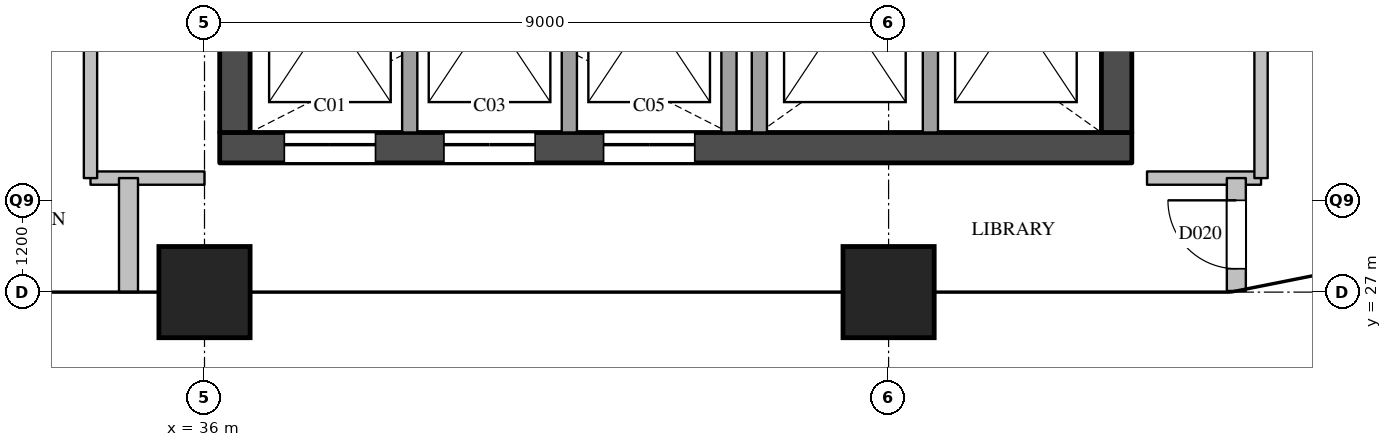
"""IFC4 building model, lengths in metres.
Left out: names, types, materials, properties, quantities, classifications, styles, units other than length and angle.
Written with IfcOpenShell. Run it as: python <this file> out.ifc"""

import sys

from ifc_helpers import new_model, si_unit, direction, frame, frame_2d, origin, origin_2d, place, context, subcontext, project, spatial, rectangle, extrude, element, fill, save


model = new_model("IFC4")
c1 = context("Model", 3, precision=1e-05, world=origin(), true_north=direction((0.0, 1.0)))
c2 = subcontext(c1, "Body", "Model", "MODEL_VIEW")
j1 = project(units=[si_unit("LENGTHUNIT", "METRE"), si_unit("PLANEANGLEUNIT", "RADIAN")], contexts=[c1])
p1 = place(None, origin())
s1 = spatial("IfcSite", under=j1, at=p1, CompositionType="ELEMENT")
p2 = place(p1, origin())
s2 = spatial("IfcBuilding", under=s1, at=p2, CompositionType="ELEMENT")
p3 = place(p2, frame((0.0, 0.0, 246.2)))
s3 = spatial("IfcBuildingStorey", under=s2, at=p3, CompositionType="ELEMENT", Elevation=246.2)
for number, where, z_axis, x_axis in (
    (1, (36.0, 27.0, 0.0), (0.0, 0.0, 1.0), (1.0, 0.0, 0.0)),
    (2, (45.0, 27.0, 0.0), (0.0, 0.0, 1.0), (1.0, 0.0, 0.0)),
):
    element("IfcColumn", number, at=place(p3, frame(where, z_axis=z_axis, x_axis=x_axis)), inside=s3, PredefinedType="COLUMN", context=c2, shape_type="SweptSolid", body=[
        extrude(rectangle(XDim=1.2, YDim=1.2, at=origin_2d()), origin(), (0.0, 0.0, 1.0), 3.9),
    ])
p4 = place(p3, frame((36.2, 28.9, 0.0), z_axis=(0.0, 0.0, 1.0), x_axis=(1.0, 0.0, 0.0)))
e3 = element("IfcWall", 3, at=p4, inside=s3, PredefinedType="SHEAR", context=c2, shape_type="SweptSolid", body=[
    extrude(rectangle(XDim=12.0, YDim=0.4, at=frame_2d((6.0, 0.0))), origin(), (0.0, 0.0, 1.0), 3.6),
])
p5 = place(p4, frame((0.85, 0.0, 0.0)))
e4 = element("IfcOpeningElement", 4, at=p5, cuts=e3, PredefinedType="OPENING", context=c2, shape_type="SweptSolid", body=[
    extrude(rectangle(XDim=1.2, YDim=2.1, at=frame_2d((0.6, 1.05))), frame((0.0, 0.21, 0.0), z_axis=(0.0, -1.0, 0.0), x_axis=(1.0, 0.0, 0.0)), (0.0, 0.0, 1.0), 0.42),
])
p6 = place(p4, frame((2.95, 0.0, 0.0)))
e5 = element("IfcOpeningElement", 5, at=p6, cuts=e3, PredefinedType="OPENING", context=c2, shape_type="SweptSolid", body=[
    extrude(rectangle(XDim=1.2, YDim=2.1, at=frame_2d((0.6, 1.05))), frame((0.0, 0.21, 0.0), z_axis=(0.0, -1.0, 0.0), x_axis=(1.0, 0.0, 0.0)), (0.0, 0.0, 1.0), 0.42),
])
p7 = place(p4, frame((5.05, 0.0, 0.0)))
e6 = element("IfcOpeningElement", 6, at=p7, cuts=e3, PredefinedType="OPENING", context=c2, shape_type="SweptSolid", body=[
    extrude(rectangle(XDim=1.2, YDim=2.1, at=frame_2d((0.6, 1.05))), frame((0.0, 0.21, 0.0), z_axis=(0.0, -1.0, 0.0), x_axis=(1.0, 0.0, 0.0)), (0.0, 0.0, 1.0), 0.42),
])
p8 = place(p3, frame((36.4, 29.1, 0.0), z_axis=(0.0, 0.0, 1.0), x_axis=(0.0, 1.0, 0.0)))
e7 = element("IfcWall", 7, at=p8, inside=s3, PredefinedType="SHEAR", context=c2, shape_type="SweptSolid", body=[
    extrude(rectangle(XDim=20.3, YDim=0.4, at=frame_2d((10.15, 0.0))), origin(), (0.0, 0.0, 1.0), 3.6),
])
p9 = place(p8, frame((3.6, 0.0, 0.0)))
e8 = element("IfcOpeningElement", 8, at=p9, cuts=e7, PredefinedType="OPENING", context=c2, shape_type="SweptSolid", body=[
    extrude(rectangle(XDim=1.8, YDim=2.1, at=frame_2d((0.9, 1.05))), frame((0.0, 0.21, 0.0), z_axis=(0.0, -1.0, 0.0), x_axis=(1.0, 0.0, 0.0)), (0.0, 0.0, 1.0), 0.42),
])
p10 = place(p8, frame((16.4, 0.0, 0.0)))
e9 = element("IfcOpeningElement", 9, at=p10, cuts=e7, PredefinedType="OPENING", context=c2, shape_type="SweptSolid", body=[
    extrude(rectangle(XDim=1.0, YDim=2.1, at=frame_2d((0.5, 1.05))), frame((0.0, 0.21, 0.0), z_axis=(0.0, -1.0, 0.0), x_axis=(1.0, 0.0, 0.0)), (0.0, 0.0, 1.0), 0.42),
])
p11 = place(p3, frame((48.0, 29.1, 0.0), z_axis=(0.0, 0.0, 1.0), x_axis=(0.0, 1.0, 0.0)))
e10 = element("IfcWall", 10, at=p11, inside=s3, PredefinedType="SHEAR", context=c2, shape_type="SweptSolid", body=[
    extrude(rectangle(XDim=20.3, YDim=0.4, at=frame_2d((10.15, 0.0))), origin(), (0.0, 0.0, 1.0), 3.6),
])
p12 = place(p11, frame((12.5, 0.0, 0.0)))
e11 = element("IfcOpeningElement", 11, at=p12, cuts=e10, PredefinedType="OPENING", context=c2, shape_type="SweptSolid", body=[
    extrude(rectangle(XDim=0.7, YDim=2.1, at=frame_2d((0.35, 1.05))), frame((0.0, 0.21, 0.0), z_axis=(0.0, -1.0, 0.0), x_axis=(1.0, 0.0, 0.0)), (0.0, 0.0, 1.0), 0.42),
])
p13 = place(p11, frame((3.9, 0.0, 0.0)))
e12 = element("IfcOpeningElement", 12, at=p13, cuts=e10, PredefinedType="OPENING", context=c2, shape_type="SweptSolid", body=[
    extrude(rectangle(XDim=1.8, YDim=2.1, at=frame_2d((0.9, 1.05))), frame((0.0, 0.21, 0.0), z_axis=(0.0, -1.0, 0.0), x_axis=(1.0, 0.0, 0.0)), (0.0, 0.0, 1.0), 0.42),
])
for number, where, z_axis, x_axis in (
    (13, (38.7, 29.1, 0.0), (0.0, 0.0, 1.0), (0.0, 1.0, 0.0)),
    (14, (40.8, 29.1, 0.0), (0.0, 0.0, 1.0), (0.0, 1.0, 0.0)),
    (15, (42.9, 29.1, 0.0), (0.0, 0.0, 1.0), (0.0, 1.0, 0.0)),
):
    element("IfcWall", number, at=place(p3, frame(where, z_axis=z_axis, x_axis=x_axis)), inside=s3, PredefinedType="SOLIDWALL", context=c2, shape_type="SweptSolid", body=[
        extrude(rectangle(XDim=3.2, YDim=0.2, at=frame_2d((1.6, 0.0))), origin(), (0.0, 0.0, 1.0), 3.6),
    ])
p14 = place(p3, frame((43.3, 29.1, 0.0), z_axis=(0.0, 0.0, 1.0), x_axis=(0.0, 1.0, 0.0)))
e16 = element("IfcWall", 16, at=p14, inside=s3, PredefinedType="SOLIDWALL", context=c2, shape_type="SweptSolid", body=[
    extrude(rectangle(XDim=9.9, YDim=0.2, at=frame_2d((4.95, 0.0))), origin(), (0.0, 0.0, 1.0), 3.6),
])
p15 = place(p3, frame((45.55, 29.1, 0.0), z_axis=(0.0, 0.0, 1.0), x_axis=(0.0, 1.0, 0.0)))
e17 = element("IfcWall", 17, at=p15, inside=s3, PredefinedType="SOLIDWALL", context=c2, shape_type="SweptSolid", body=[
    extrude(rectangle(XDim=3.2, YDim=0.2, at=frame_2d((1.6, 0.0))), origin(), (0.0, 0.0, 1.0), 3.6),
])
for number, where, z_axis, x_axis in (
    (18, (34.5, 28.5, 0.0), (0.0, 0.0, 1.0), (1.0, 0.0, 0.0)),
    (19, (48.4, 28.5, 0.0), (0.0, 0.0, 1.0), (1.0, 0.0, 0.0)),
):
    element("IfcWall", number, at=place(p3, frame(where, z_axis=z_axis, x_axis=x_axis)), inside=s3, PredefinedType="PARTITIONING", context=c2, shape_type="SweptSolid", body=[
        extrude(rectangle(XDim=1.5, YDim=0.175, at=frame_2d((0.75, 0.0))), origin(), (0.0, 0.0, 1.0), 3.6),
    ])
p16 = place(p3, frame((34.5, 28.5, 0.0), z_axis=(0.0, 0.0, 1.0), x_axis=(0.0, 1.0, 0.0)))
e20 = element("IfcWall", 20, at=p16, inside=s3, PredefinedType="PARTITIONING", context=c2, shape_type="SweptSolid", body=[
    extrude(rectangle(XDim=15.7, YDim=0.175, at=frame_2d((7.85, 0.0))), origin(), (0.0, 0.0, 1.0), 3.6),
])
p17 = place(p16, frame((10.1, 0.0, 0.0)))
e21 = element("IfcOpeningElement", 21, at=p17, cuts=e20, PredefinedType="OPENING", context=c2, shape_type="SweptSolid", body=[
    extrude(rectangle(XDim=1.0, YDim=2.1, at=frame_2d((0.5, 1.05))), frame((0.0, 0.097, 0.0), z_axis=(0.0, -1.0, 0.0), x_axis=(1.0, 0.0, 0.0)), (0.0, 0.0, 1.0), 0.195),
])
p18 = place(p16, frame((11.9, 0.0, 0.0)))
e22 = element("IfcOpeningElement", 22, at=p18, cuts=e20, PredefinedType="OPENING", context=c2, shape_type="SweptSolid", body=[
    extrude(rectangle(XDim=1.0, YDim=2.1, at=frame_2d((0.5, 1.05))), frame((0.0, 0.097, 0.0), z_axis=(0.0, -1.0, 0.0), x_axis=(1.0, 0.0, 0.0)), (0.0, 0.0, 1.0), 0.195),
])
p19 = place(p3, frame((49.9, 28.5, 0.0), z_axis=(0.0, 0.0, 1.0), x_axis=(0.0, 1.0, 0.0)))
e23 = element("IfcWall", 23, at=p19, inside=s3, PredefinedType="PARTITIONING", context=c2, shape_type="SweptSolid", body=[
    extrude(rectangle(XDim=23.0, YDim=0.175, at=frame_2d((11.5, 0.0))), origin(), (0.0, 0.0, 1.0), 3.6),
])
p20 = place(p19, frame((7.8, 0.0, 0.0)))
e24 = element("IfcOpeningElement", 24, at=p20, cuts=e23, PredefinedType="OPENING", context=c2, shape_type="SweptSolid", body=[
    extrude(rectangle(XDim=0.9, YDim=2.1, at=frame_2d((0.45, 1.05))), frame((0.0, 0.097, 0.0), z_axis=(0.0, -1.0, 0.0), x_axis=(1.0, 0.0, 0.0)), (0.0, 0.0, 1.0), 0.195),
])
p21 = place(p19, frame((19.3, 0.0, 0.0)))
e25 = element("IfcOpeningElement", 25, at=p21, cuts=e23, PredefinedType="OPENING", context=c2, shape_type="SweptSolid", body=[
    extrude(rectangle(XDim=0.9, YDim=2.1, at=frame_2d((0.45, 1.05))), frame((0.0, 0.097, 0.0), z_axis=(0.0, -1.0, 0.0), x_axis=(1.0, 0.0, 0.0)), (0.0, 0.0, 1.0), 0.195),
])
p22 = place(p3, frame((35.0, 27.0, 0.0), z_axis=(0.0, 0.0, 1.0), x_axis=(0.0, 1.0, 0.0)))
e26 = element("IfcWall", 26, at=p22, inside=s3, PredefinedType="PARTITIONING", context=c2, shape_type="SweptSolid", body=[
    extrude(rectangle(XDim=1.5, YDim=0.25, at=frame_2d((0.75, 0.0))), origin(), (0.0, 0.0, 1.0), 2.6),
])
p23 = place(p3, frame((49.575, 27.015, 0.0), z_axis=(0.0, 0.0, 1.0), x_axis=(0.0, 1.0, 0.0)))
e27 = element("IfcWall", 27, at=p23, inside=s3, PredefinedType="PARTITIONING", context=c2, shape_type="SweptSolid", body=[
    extrude(rectangle(XDim=1.485, YDim=0.25, at=frame_2d((0.743, 0.0))), origin(), (0.0, 0.0, 1.0), 2.6),
])
p24 = place(p23, frame((0.292, 0.0, 0.0)))
e28 = element("IfcOpeningElement", 28, at=p24, cuts=e27, PredefinedType="OPENING", context=c2, shape_type="SweptSolid", body=[
    extrude(rectangle(XDim=0.9, YDim=2.1, at=frame_2d((0.45, 1.05))), frame((0.0, 0.135, 0.0), z_axis=(0.0, -1.0, 0.0), x_axis=(1.0, 0.0, 0.0)), (0.0, 0.0, 1.0), 0.27),
])
p25 = place(p5, origin())
e29 = element("IfcDoor", 29, at=p25, inside=s3, OperationType="SLIDING_TO_LEFT", PredefinedType="DOOR", context=c2, shape_type="SweptSolid", body=[
    extrude(rectangle(XDim=1.2, YDim=2.1, at=frame_2d((0.6, 1.05))), frame((0.0, 0.025, 0.0), z_axis=(0.0, -1.0, 0.0), x_axis=(1.0, 0.0, 0.0)), (0.0, 0.0, 1.0), 0.05),
])
fill(e4, e29)
p26 = place(p6, origin())
e30 = element("IfcDoor", 30, at=p26, inside=s3, OperationType="SLIDING_TO_LEFT", PredefinedType="DOOR", context=c2, shape_type="SweptSolid", body=[
    extrude(rectangle(XDim=1.2, YDim=2.1, at=frame_2d((0.6, 1.05))), frame((0.0, 0.025, 0.0), z_axis=(0.0, -1.0, 0.0), x_axis=(1.0, 0.0, 0.0)), (0.0, 0.0, 1.0), 0.05),
])
fill(e5, e30)
p27 = place(p7, origin())
e31 = element("IfcDoor", 31, at=p27, inside=s3, OperationType="SLIDING_TO_LEFT", PredefinedType="DOOR", context=c2, shape_type="SweptSolid", body=[
    extrude(rectangle(XDim=1.2, YDim=2.1, at=frame_2d((0.6, 1.05))), frame((0.0, 0.025, 0.0), z_axis=(0.0, -1.0, 0.0), x_axis=(1.0, 0.0, 0.0)), (0.0, 0.0, 1.0), 0.05),
])
fill(e6, e31)
p28 = place(p24, origin())
e32 = element("IfcDoor", 32, at=p28, inside=s3, OperationType="SINGLE_SWING_RIGHT", PredefinedType="DOOR", context=c2, shape_type="SweptSolid", body=[
    extrude(rectangle(XDim=0.9, YDim=2.1, at=frame_2d((0.45, 1.05))), frame((0.0, 0.025, 0.0), z_axis=(0.0, -1.0, 0.0), x_axis=(1.0, 0.0, 0.0)), (0.0, 0.0, 1.0), 0.05),
])
fill(e28, e32)
save(model, sys.argv[1])
